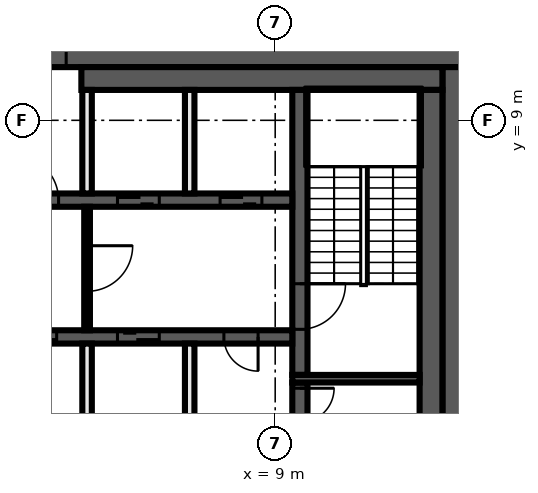
"""IFC4 building model, lengths in metres.
Left out: names, types, materials, properties, quantities, classifications, styles, units other than length and angle.
Written with IfcOpenShell. Run it as: python <this file> out.ifc"""

import sys

from ifc_helpers import new_model, si_unit, direction, frame, frame_2d, origin, place, context, subcontext, project, spatial, rectangle, extrude, element, fill, save


model = new_model("IFC4")
c1 = context("Model", 3, precision=1e-05, world=origin(), true_north=direction((0.0, 1.0)))
c2 = subcontext(c1, "Body", "Model", "MODEL_VIEW")
j1 = project(units=[si_unit("LENGTHUNIT", "METRE"), si_unit("PLANEANGLEUNIT", "RADIAN")], contexts=[c1])
p1 = place(None, origin())
s1 = spatial("IfcSite", under=j1, at=p1, CompositionType="ELEMENT")
p2 = place(p1, origin())
s2 = spatial("IfcBuilding", under=s1, at=p2, CompositionType="ELEMENT")
p3 = place(p2, frame((0.0, 0.0, 367.4)))
s3 = spatial("IfcBuildingStorey", under=s2, at=p3, CompositionType="ELEMENT", Elevation=367.4)
p4 = place(p3, frame((11.367, -20.469, 0.0), z_axis=(0.0, 0.0, 1.0), x_axis=(0.424125024155, 0.905603646131, 0.0)))
e1 = element("IfcWall", 1, at=p4, inside=s3, PredefinedType="SOLIDWALL", context=c2, shape_type="SweptSolid", body=[
    extrude(rectangle(XDim=28.801, YDim=0.25, at=frame_2d((14.401, 0.0))), origin(), (0.0, 0.0, 1.0), 3.8),
])
p5 = place(p3, frame((23.583, 5.614, 0.0), z_axis=(0.0, 0.0, 1.0), x_axis=(-0.671256862452, 0.741224813812, 0.0)))
e2 = element("IfcWall", 2, at=p5, inside=s3, PredefinedType="SOLIDWALL", context=c2, shape_type="SweptSolid", body=[
    extrude(rectangle(XDim=20.856, YDim=0.25, at=frame_2d((10.428, 0.0))), origin(), (0.0, 0.0, 1.0), 3.8),
])
p6 = place(p3, frame((-14.0, 10.7, 0.0), z_axis=(0.0, 0.0, 1.0), x_axis=(1.0, 0.0, 0.0)))
e3 = element("IfcWall", 3, at=p6, inside=s3, PredefinedType="SHEAR", context=c2, shape_type="SweptSolid", body=[
    extrude(rectangle(XDim=28.0, YDim=0.6, at=frame_2d((14.0, 0.0))), origin(), (0.0, 0.0, 1.0), 3.8),
])
p7 = place(p6, frame((15.9, 0.0, 0.0)))
e4 = element("IfcOpeningElement", 4, at=p7, cuts=e3, PredefinedType="OPENING", context=c2, shape_type="SweptSolid", body=[
    extrude(rectangle(XDim=1.6, YDim=2.1, at=frame_2d((0.8, 1.05))), frame((0.0, 0.31, 0.0), z_axis=(0.0, -1.0, 0.0), x_axis=(1.0, 0.0, 0.0)), (0.0, 0.0, 1.0), 0.62),
])
p8 = place(p3, frame((13.7, 10.4, 0.0), z_axis=(0.0, 0.0, 1.0), x_axis=(0.0, -1.0, 0.0)))
e5 = element("IfcWall", 5, at=p8, inside=s3, PredefinedType="SHEAR", context=c2, shape_type="SweptSolid", body=[
    extrude(rectangle(XDim=20.8, YDim=0.6, at=frame_2d((10.4, 0.0))), origin(), (0.0, 0.0, 1.0), 3.8),
])
p9 = place(p3, frame((3.9, 10.1, 0.0), z_axis=(0.0, 0.0, 1.0), x_axis=(1.0, 0.0, 0.0)))
e6 = element("IfcWall", 6, at=p9, inside=s3, PredefinedType="SHEAR", context=c2, shape_type="SweptSolid", body=[
    extrude(rectangle(XDim=9.5, YDim=0.6, at=frame_2d((4.75, 0.0))), origin(), (0.0, 0.0, 1.0), 3.8),
])
p10 = place(p3, frame((13.1, 9.8, 0.0), z_axis=(0.0, 0.0, 1.0), x_axis=(0.0, -1.0, 0.0)))
e7 = element("IfcWall", 7, at=p10, inside=s3, PredefinedType="SHEAR", context=c2, shape_type="SweptSolid", body=[
    extrude(rectangle(XDim=19.6, YDim=0.6, at=frame_2d((9.8, 0.0))), origin(), (0.0, 0.0, 1.0), 3.8),
])
p11 = place(p3, frame((9.65, 2.1, 0.0), z_axis=(0.0, 0.0, 1.0), x_axis=(0.0, -1.0, 0.0)))
e8 = element("IfcWall", 8, at=p11, inside=s3, PredefinedType="SHEAR", context=c2, shape_type="SweptSolid", body=[
    extrude(rectangle(XDim=4.2, YDim=0.4, at=frame_2d((2.1, 0.0))), origin(), (0.0, 0.0, 1.0), 3.8),
])
p12 = place(p11, frame((0.15, 0.0, 0.0)))
e9 = element("IfcOpeningElement", 9, at=p12, cuts=e8, PredefinedType="OPENING", context=c2, shape_type="SweptSolid", body=[
    extrude(rectangle(XDim=0.9, YDim=2.1, at=frame_2d((0.45, 1.05))), frame((0.0, 0.21, 0.0), z_axis=(0.0, -1.0, 0.0), x_axis=(1.0, 0.0, 0.0)), (0.0, 0.0, 1.0), 0.42),
])
p13 = place(p3, frame((9.65, 9.8, 0.0), z_axis=(0.0, 0.0, 1.0), x_axis=(0.0, -1.0, 0.0)))
e10 = element("IfcWall", 10, at=p13, inside=s3, PredefinedType="SHEAR", context=c2, shape_type="SweptSolid", body=[
    extrude(rectangle(XDim=7.5, YDim=0.4, at=frame_2d((3.75, 0.0))), origin(), (0.0, 0.0, 1.0), 3.8),
])
p14 = place(p13, frame((5.1, 0.0, 0.0)))
e11 = element("IfcOpeningElement", 11, at=p14, cuts=e10, PredefinedType="OPENING", context=c2, shape_type="SweptSolid", body=[
    extrude(rectangle(XDim=1.2, YDim=2.1, at=frame_2d((0.6, 1.05))), frame((0.0, 0.21, 0.0), z_axis=(0.0, -1.0, 0.0), x_axis=(1.0, 0.0, 0.0)), (0.0, 0.0, 1.0), 0.42),
])
p15 = place(p3, frame((9.45, 2.2, 0.0), z_axis=(0.0, 0.0, 1.0), x_axis=(1.0, 0.0, 0.0)))
e12 = element("IfcWall", 12, at=p15, inside=s3, PredefinedType="SHEAR", context=c2, shape_type="SweptSolid", body=[
    extrude(rectangle(XDim=3.35, YDim=0.2, at=frame_2d((1.675, 0.0))), origin(), (0.0, 0.0, 1.0), 3.8),
])
p16 = place(p3, frame((-9.45, 6.9, 0.0), z_axis=(0.0, 0.0, 1.0), x_axis=(1.0, 0.0, 0.0)))
e13 = element("IfcWall", 13, at=p16, inside=s3, PredefinedType="SHEAR", context=c2, shape_type="SweptSolid", body=[
    extrude(rectangle(XDim=18.9, YDim=0.35, at=frame_2d((9.45, 0.0))), origin(), (0.0, 0.0, 1.0), 3.8),
])
p17 = place(p16, frame((11.55, 0.0, 0.0)))
e14 = element("IfcOpeningElement", 14, at=p17, cuts=e13, PredefinedType="OPENING", context=c2, shape_type="SweptSolid", body=[
    extrude(rectangle(XDim=1.2, YDim=2.1, at=frame_2d((0.6, 1.05))), frame((0.0, 0.185, 0.0), z_axis=(0.0, -1.0, 0.0), x_axis=(1.0, 0.0, 0.0)), (0.0, 0.0, 1.0), 0.37),
])
p18 = place(p16, frame((14.3, 0.0, 0.0)))
e15 = element("IfcOpeningElement", 15, at=p18, cuts=e13, PredefinedType="OPENING", context=c2, shape_type="SweptSolid", body=[
    extrude(rectangle(XDim=1.1, YDim=2.1, at=frame_2d((0.55, 1.05))), frame((0.0, 0.185, 0.0), z_axis=(0.0, -1.0, 0.0), x_axis=(1.0, 0.0, 0.0)), (0.0, 0.0, 1.0), 0.37),
])
p19 = place(p16, frame((17.0, 0.0, 0.0)))
e16 = element("IfcOpeningElement", 16, at=p19, cuts=e13, PredefinedType="OPENING", context=c2, shape_type="SweptSolid", body=[
    extrude(rectangle(XDim=1.1, YDim=2.1, at=frame_2d((0.55, 1.05))), frame((0.0, 0.185, 0.0), z_axis=(0.0, -1.0, 0.0), x_axis=(1.0, 0.0, 0.0)), (0.0, 0.0, 1.0), 0.37),
])
p20 = place(p16, frame((2.25, 0.0, 0.0)))
e17 = element("IfcOpeningElement", 17, at=p20, cuts=e13, PredefinedType="OPENING", context=c2, shape_type="SweptSolid", body=[
    extrude(rectangle(XDim=0.9, YDim=2.1, at=frame_2d((0.45, 1.05))), frame((0.0, 0.185, 0.0), z_axis=(0.0, -1.0, 0.0), x_axis=(1.0, 0.0, 0.0)), (0.0, 0.0, 1.0), 0.37),
])
p21 = place(p16, frame((6.3, 0.0, 0.0)))
e18 = element("IfcOpeningElement", 18, at=p21, cuts=e13, PredefinedType="OPENING", context=c2, shape_type="SweptSolid", body=[
    extrude(rectangle(XDim=0.9, YDim=2.1, at=frame_2d((0.45, 1.05))), frame((0.0, 0.185, 0.0), z_axis=(0.0, -1.0, 0.0), x_axis=(1.0, 0.0, 0.0)), (0.0, 0.0, 1.0), 0.37),
])
p22 = place(p16, frame((9.0, 0.0, 0.0)))
e19 = element("IfcOpeningElement", 19, at=p22, cuts=e13, PredefinedType="OPENING", context=c2, shape_type="SweptSolid", body=[
    extrude(rectangle(XDim=0.9, YDim=2.1, at=frame_2d((0.45, 1.05))), frame((0.0, 0.185, 0.0), z_axis=(0.0, -1.0, 0.0), x_axis=(1.0, 0.0, 0.0)), (0.0, 0.0, 1.0), 0.37),
])
p23 = place(p3, frame((9.45, 3.3, 0.0), z_axis=(0.0, 0.0, 1.0), x_axis=(-1.0, 0.0, 0.0)))
e20 = element("IfcWall", 20, at=p23, inside=s3, PredefinedType="SHEAR", context=c2, shape_type="SweptSolid", body=[
    extrude(rectangle(XDim=18.9, YDim=0.35, at=frame_2d((9.45, 0.0))), origin(), (0.0, 0.0, 1.0), 3.8),
])
p24 = place(p23, frame((6.2, 0.0, 0.0)))
e21 = element("IfcOpeningElement", 21, at=p24, cuts=e20, PredefinedType="OPENING", context=c2, shape_type="SweptSolid", body=[
    extrude(rectangle(XDim=1.1, YDim=2.1, at=frame_2d((0.55, 1.05))), frame((0.0, 0.185, 0.0), z_axis=(0.0, -1.0, 0.0), x_axis=(1.0, 0.0, 0.0)), (0.0, 0.0, 1.0), 0.37),
])
p25 = place(p23, frame((3.5, 0.0, 0.0)))
e22 = element("IfcOpeningElement", 22, at=p25, cuts=e20, PredefinedType="OPENING", context=c2, shape_type="SweptSolid", body=[
    extrude(rectangle(XDim=1.1, YDim=2.1, at=frame_2d((0.55, 1.05))), frame((0.0, 0.185, 0.0), z_axis=(0.0, -1.0, 0.0), x_axis=(1.0, 0.0, 0.0)), (0.0, 0.0, 1.0), 0.37),
])
p26 = place(p23, frame((0.9, 0.0, 0.0)))
e23 = element("IfcOpeningElement", 23, at=p26, cuts=e20, PredefinedType="OPENING", context=c2, shape_type="SweptSolid", body=[
    extrude(rectangle(XDim=0.9, YDim=2.1, at=frame_2d((0.45, 1.05))), frame((0.0, 0.185, 0.0), z_axis=(0.0, -1.0, 0.0), x_axis=(1.0, 0.0, 0.0)), (0.0, 0.0, 1.0), 0.37),
])
p27 = place(p23, frame((17.1, 0.0, 0.0)))
e24 = element("IfcOpeningElement", 24, at=p27, cuts=e20, PredefinedType="OPENING", context=c2, shape_type="SweptSolid", body=[
    extrude(rectangle(XDim=0.9, YDim=2.1, at=frame_2d((0.45, 1.05))), frame((0.0, 0.185, 0.0), z_axis=(0.0, -1.0, 0.0), x_axis=(1.0, 0.0, 0.0)), (0.0, 0.0, 1.0), 0.37),
])
p28 = place(p23, frame((13.05, 0.0, 0.0)))
e25 = element("IfcOpeningElement", 25, at=p28, cuts=e20, PredefinedType="OPENING", context=c2, shape_type="SweptSolid", body=[
    extrude(rectangle(XDim=0.9, YDim=2.1, at=frame_2d((0.45, 1.05))), frame((0.0, 0.185, 0.0), z_axis=(0.0, -1.0, 0.0), x_axis=(1.0, 0.0, 0.0)), (0.0, 0.0, 1.0), 0.37),
])
p29 = place(p23, frame((9.0, 0.0, 0.0)))
e26 = element("IfcOpeningElement", 26, at=p29, cuts=e20, PredefinedType="OPENING", context=c2, shape_type="SweptSolid", body=[
    extrude(rectangle(XDim=0.9, YDim=2.1, at=frame_2d((0.45, 1.05))), frame((0.0, 0.185, 0.0), z_axis=(0.0, -1.0, 0.0), x_axis=(1.0, 0.0, 0.0)), (0.0, 0.0, 1.0), 0.37),
])
for number, where, z_axis, x_axis in (
    (27, (6.75, 0.4, 0.0), (0.0, 0.0, 1.0), (0.0, 1.0, 0.0)),
    (28, (6.75, 7.075, 0.0), (0.0, 0.0, 1.0), (0.0, 1.0, 0.0)),
):
    element("IfcWall", number, at=place(p3, frame(where, z_axis=z_axis, x_axis=x_axis)), inside=s3, PredefinedType="SOLIDWALL", context=c2, shape_type="SweptSolid", body=[
        extrude(rectangle(XDim=2.725, YDim=0.25, at=frame_2d((1.363, 0.0))), origin(), (0.0, 0.0, 1.0), 3.8),
    ])
p30 = place(p3, frame((4.05, 6.725, 0.0), z_axis=(0.0, 0.0, 1.0), x_axis=(0.0, -1.0, 0.0)))
e29 = element("IfcWall", 29, at=p30, inside=s3, PredefinedType="PARTITIONING", context=c2, shape_type="SweptSolid", body=[
    extrude(rectangle(XDim=3.25, YDim=0.15, at=frame_2d((1.625, 0.0))), origin(), (0.0, 0.0, 1.0), 3.8),
])
p31 = place(p30, frame((1.025, 0.0, 0.0)))
e30 = element("IfcOpeningElement", 30, at=p31, cuts=e29, PredefinedType="OPENING", context=c2, shape_type="SweptSolid", body=[
    extrude(rectangle(XDim=1.2, YDim=2.1, at=frame_2d((0.6, 1.05))), frame((0.0, 0.085, 0.0), z_axis=(0.0, -1.0, 0.0), x_axis=(1.0, 0.0, 0.0)), (0.0, 0.0, 1.0), 0.17),
])
for number, where, z_axis, x_axis in (
    (31, (4.05, 0.4, 0.0), (0.0, 0.0, 1.0), (0.0, 1.0, 0.0)),
    (32, (4.05, 7.075, 0.0), (0.0, 0.0, 1.0), (0.0, 1.0, 0.0)),
):
    element("IfcWall", number, at=place(p3, frame(where, z_axis=z_axis, x_axis=x_axis)), inside=s3, PredefinedType="SOLIDWALL", context=c2, shape_type="SweptSolid", body=[
        extrude(rectangle(XDim=2.725, YDim=0.25, at=frame_2d((1.363, 0.0))), origin(), (0.0, 0.0, 1.0), 3.8),
    ])
p32 = place(p12, origin())
e33 = element("IfcDoor", 33, at=p32, inside=s3, OperationType="SINGLE_SWING_RIGHT", PredefinedType="DOOR", context=c2, shape_type="SweptSolid", body=[
    extrude(rectangle(XDim=0.9, YDim=2.1, at=frame_2d((0.45, 1.05))), frame((0.0, 0.025, 0.0), z_axis=(0.0, -1.0, 0.0), x_axis=(1.0, 0.0, 0.0)), (0.0, 0.0, 1.0), 0.05),
])
fill(e9, e33)
p33 = place(p7, origin())
e34 = element("IfcDoor", 34, at=p33, inside=s3, OperationType="DOUBLE_DOOR_SINGLE_SWING", PredefinedType="DOOR", context=c2, shape_type="SweptSolid", body=[
    extrude(rectangle(XDim=1.6, YDim=2.1, at=frame_2d((0.8, 1.05))), frame((0.0, 0.025, 0.0), z_axis=(0.0, -1.0, 0.0), x_axis=(1.0, 0.0, 0.0)), (0.0, 0.0, 1.0), 0.05),
])
fill(e4, e34)
p34 = place(p17, origin())
e35 = element("IfcDoor", 35, at=p34, inside=s3, OperationType="SINGLE_SWING_LEFT", PredefinedType="DOOR", context=c2, shape_type="SweptSolid", body=[
    extrude(rectangle(XDim=1.2, YDim=2.1, at=frame_2d((0.6, 1.05))), frame((0.0, 0.025, 0.0), z_axis=(0.0, -1.0, 0.0), x_axis=(1.0, 0.0, 0.0)), (0.0, 0.0, 1.0), 0.05),
])
fill(e14, e35)
p35 = place(p18, origin())
e36 = element("IfcDoor", 36, at=p35, inside=s3, OperationType="DOUBLE_DOOR_SLIDING", PredefinedType="DOOR", context=c2, shape_type="SweptSolid", body=[
    extrude(rectangle(XDim=1.1, YDim=2.1, at=frame_2d((0.55, 1.05))), frame((0.0, 0.025, 0.0), z_axis=(0.0, -1.0, 0.0), x_axis=(1.0, 0.0, 0.0)), (0.0, 0.0, 1.0), 0.05),
])
fill(e15, e36)
p36 = place(p19, origin())
e37 = element("IfcDoor", 37, at=p36, inside=s3, OperationType="DOUBLE_DOOR_SLIDING", PredefinedType="DOOR", context=c2, shape_type="SweptSolid", body=[
    extrude(rectangle(XDim=1.1, YDim=2.1, at=frame_2d((0.55, 1.05))), frame((0.0, 0.025, 0.0), z_axis=(0.0, -1.0, 0.0), x_axis=(1.0, 0.0, 0.0)), (0.0, 0.0, 1.0), 0.05),
])
fill(e16, e37)
p37 = place(p24, origin())
e38 = element("IfcDoor", 38, at=p37, inside=s3, OperationType="DOUBLE_DOOR_SLIDING", PredefinedType="DOOR", context=c2, shape_type="SweptSolid", body=[
    extrude(rectangle(XDim=1.1, YDim=2.1, at=frame_2d((0.55, 1.05))), frame((0.0, 0.025, 0.0), z_axis=(0.0, -1.0, 0.0), x_axis=(1.0, 0.0, 0.0)), (0.0, 0.0, 1.0), 0.05),
])
fill(e21, e38)
p38 = place(p25, origin())
e39 = element("IfcDoor", 39, at=p38, inside=s3, OperationType="DOUBLE_DOOR_SLIDING", PredefinedType="DOOR", context=c2, shape_type="SweptSolid", body=[
    extrude(rectangle(XDim=1.1, YDim=2.1, at=frame_2d((0.55, 1.05))), frame((0.0, 0.025, 0.0), z_axis=(0.0, -1.0, 0.0), x_axis=(1.0, 0.0, 0.0)), (0.0, 0.0, 1.0), 0.05),
])
fill(e22, e39)
p39 = place(p26, origin())
e40 = element("IfcDoor", 40, at=p39, inside=s3, OperationType="SINGLE_SWING_LEFT", PredefinedType="DOOR", context=c2, shape_type="SweptSolid", body=[
    extrude(rectangle(XDim=0.9, YDim=2.1, at=frame_2d((0.45, 1.05))), frame((0.0, 0.025, 0.0), z_axis=(0.0, -1.0, 0.0), x_axis=(1.0, 0.0, 0.0)), (0.0, 0.0, 1.0), 0.05),
])
fill(e23, e40)
p40 = place(p14, origin())
e41 = element("IfcDoor", 41, at=p40, inside=s3, OperationType="SINGLE_SWING_LEFT", PredefinedType="DOOR", context=c2, shape_type="SweptSolid", body=[
    extrude(rectangle(XDim=1.2, YDim=2.1, at=frame_2d((0.6, 1.05))), frame((0.0, 0.025, 0.0), z_axis=(0.0, -1.0, 0.0), x_axis=(1.0, 0.0, 0.0)), (0.0, 0.0, 1.0), 0.05),
])
fill(e11, e41)
p41 = place(p31, origin())
e42 = element("IfcDoor", 42, at=p41, inside=s3, OperationType="SINGLE_SWING_RIGHT", PredefinedType="DOOR", context=c2, shape_type="SweptSolid", body=[
    extrude(rectangle(XDim=1.2, YDim=2.1, at=frame_2d((0.6, 1.05))), frame((0.0, 0.025, 0.0), z_axis=(0.0, -1.0, 0.0), x_axis=(1.0, 0.0, 0.0)), (0.0, 0.0, 1.0), 0.05),
])
fill(e30, e42)
save(model, sys.argv[1])
